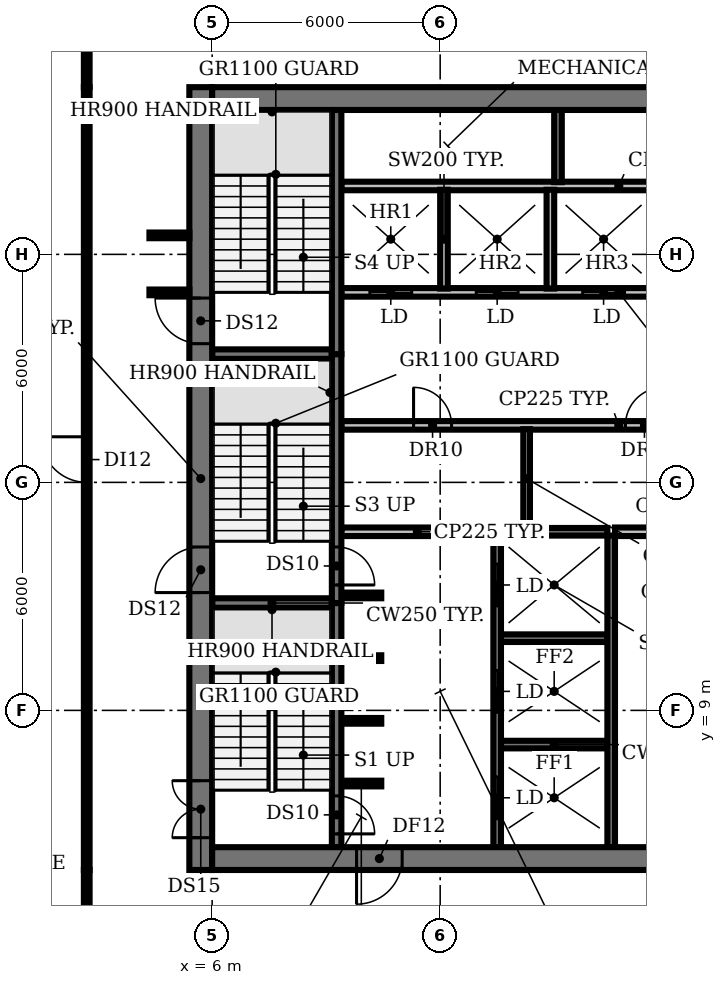
"""IFC4 building model, lengths in metres.
Left out: names, types, materials, properties, quantities, classifications, styles, units other than length and angle.
Written with IfcOpenShell. Run it as: python <this file> out.ifc"""

import sys

from ifc_helpers import new_model, si_unit, direction, frame, frame_2d, origin, place, context, subcontext, project, spatial, rectangle, extrude, element, fill, save


model = new_model("IFC4")
c1 = context("Model", 3, precision=1e-05, world=origin(), true_north=direction((0.0, 1.0)))
c2 = subcontext(c1, "Body", "Model", "MODEL_VIEW")
j1 = project(units=[si_unit("LENGTHUNIT", "METRE"), si_unit("PLANEANGLEUNIT", "RADIAN")], contexts=[c1])
p1 = place(None, origin())
s1 = spatial("IfcSite", under=j1, at=p1, CompositionType="ELEMENT")
p2 = place(p1, origin())
s2 = spatial("IfcBuilding", under=s1, at=p2, CompositionType="ELEMENT")
p3 = place(p2, frame((0.0, 0.0, 146.6)))
s3 = spatial("IfcBuildingStorey", under=s2, at=p3, CompositionType="ELEMENT", Elevation=146.6)
p4 = place(p3, frame((9.4, 7.075, 0.0), z_axis=(0.0, 0.0, 1.0), x_axis=(1.0, 0.0, 0.0)))
e1 = element("IfcWall", 1, at=p4, inside=s3, PredefinedType="SHEAR", context=c2, shape_type="SweptSolid", body=[
    extrude(rectangle(XDim=1.05, YDim=0.15, at=frame_2d((0.525, 0.0))), origin(), (0.0, 0.0, 1.0), 3.85),
])
p5 = place(p3, frame((13.6, 8.1, 0.0), z_axis=(0.0, 0.0, 1.0), x_axis=(1.0, 0.0, 0.0)))
e2 = element("IfcWall", 2, at=p5, inside=s3, PredefinedType="SHEAR", context=c2, shape_type="SweptSolid", body=[
    extrude(rectangle(XDim=2.8, YDim=0.2, at=frame_2d((1.4, 0.0))), origin(), (0.0, 0.0, 1.0), 3.85),
])
for number, where, z_axis, x_axis in (
    (3, (9.4, 8.725, 0.0), (0.0, 0.0, 1.0), (1.0, 0.0, 0.0)),
    (4, (9.4, 10.375, 0.0), (0.0, 0.0, 1.0), (1.0, 0.0, 0.0)),
):
    element("IfcWall", number, at=place(p3, frame(where, z_axis=z_axis, x_axis=x_axis)), inside=s3, PredefinedType="SHEAR", context=c2, shape_type="SweptSolid", body=[
        extrude(rectangle(XDim=1.05, YDim=0.15, at=frame_2d((0.525, 0.0))), origin(), (0.0, 0.0, 1.0), 3.85),
    ])
p6 = place(p3, frame((13.6, 10.9, 0.0), z_axis=(0.0, 0.0, 1.0), x_axis=(1.0, 0.0, 0.0)))
e5 = element("IfcWall", 5, at=p6, inside=s3, PredefinedType="SHEAR", context=c2, shape_type="SweptSolid", body=[
    extrude(rectangle(XDim=2.8, YDim=0.2, at=frame_2d((1.4, 0.0))), origin(), (0.0, 0.0, 1.0), 3.85),
])
p7 = place(p3, frame((6.0, 11.825, 0.0), z_axis=(0.0, 0.0, 1.0), x_axis=(1.0, 0.0, 0.0)))
e6 = element("IfcWall", 6, at=p7, inside=s3, PredefinedType="SHEAR", context=c2, shape_type="SweptSolid", body=[
    extrude(rectangle(XDim=3.15, YDim=0.25, at=frame_2d((1.575, 0.0))), origin(), (0.0, 0.0, 1.0), 3.85),
])
p8 = place(p3, frame((9.4, 12.025, 0.0), z_axis=(0.0, 0.0, 1.0), x_axis=(1.0, 0.0, 0.0)))
e7 = element("IfcWall", 7, at=p8, inside=s3, PredefinedType="SHEAR", context=c2, shape_type="SweptSolid", body=[
    extrude(rectangle(XDim=1.05, YDim=0.15, at=frame_2d((0.525, 0.0))), origin(), (0.0, 0.0, 1.0), 3.85),
])
p9 = place(p3, frame((9.4, 13.7, 0.0), z_axis=(0.0, 0.0, 1.0), x_axis=(1.0, 0.0, 0.0)))
e8 = element("IfcWall", 8, at=p9, inside=s3, PredefinedType="PARTITIONING", context=c2, shape_type="SweptSolid", body=[
    extrude(rectangle(XDim=4.0, YDim=0.225, at=frame_2d((2.0, 0.0))), origin(), (0.0, 0.0, 1.0), 3.85),
])
p10 = place(p3, frame((13.6, 13.7, 0.0), z_axis=(0.0, 0.0, 1.0), x_axis=(1.0, 0.0, 0.0)))
e9 = element("IfcWall", 9, at=p10, inside=s3, PredefinedType="SHEAR", context=c2, shape_type="SweptSolid", body=[
    extrude(rectangle(XDim=2.8, YDim=0.2, at=frame_2d((1.4, 0.0))), origin(), (0.0, 0.0, 1.0), 3.85),
])
p11 = place(p3, frame((16.6, 13.7, 0.0), z_axis=(0.0, 0.0, 1.0), x_axis=(1.0, 0.0, 0.0)))
e10 = element("IfcWall", 10, at=p11, inside=s3, PredefinedType="PARTITIONING", context=c2, shape_type="SweptSolid", body=[
    extrude(rectangle(XDim=7.4, YDim=0.225, at=frame_2d((3.7, 0.0))), origin(), (0.0, 0.0, 1.0), 3.85),
])
p12 = place(p3, frame((9.4, 16.5, 0.0), z_axis=(0.0, 0.0, 1.0), x_axis=(1.0, 0.0, 0.0)))
e11 = element("IfcWall", 11, at=p12, inside=s3, PredefinedType="PARTITIONING", context=c2, shape_type="SweptSolid", body=[
    extrude(rectangle(XDim=14.6, YDim=0.225, at=frame_2d((7.3, 0.0))), origin(), (0.0, 0.0, 1.0), 3.85),
])
p13 = place(p12, frame((1.9, 0.0, 0.0)))
e12 = element("IfcOpeningElement", 12, at=p13, cuts=e11, PredefinedType="OPENING", context=c2, shape_type="SweptSolid", body=[
    extrude(rectangle(XDim=1.0, YDim=2.1, at=frame_2d((0.5, 1.05))), frame((0.0, 0.123, 0.0), z_axis=(0.0, -1.0, 0.0), x_axis=(1.0, 0.0, 0.0)), (0.0, 0.0, 1.0), 0.245),
])
p14 = place(p12, frame((7.475, 0.0, 0.0)))
e13 = element("IfcOpeningElement", 13, at=p14, cuts=e11, PredefinedType="OPENING", context=c2, shape_type="SweptSolid", body=[
    extrude(rectangle(XDim=1.0, YDim=2.1, at=frame_2d((0.5, 1.05))), frame((0.0, 0.123, 0.0), z_axis=(0.0, -1.0, 0.0), x_axis=(1.0, 0.0, 0.0)), (0.0, 0.0, 1.0), 0.245),
])
p15 = place(p12, frame((12.4, 0.0, 0.0)))
e14 = element("IfcOpeningElement", 14, at=p15, cuts=e11, PredefinedType="OPENING", context=c2, shape_type="SweptSolid", body=[
    extrude(rectangle(XDim=1.0, YDim=2.1, at=frame_2d((0.5, 1.05))), frame((0.0, 0.123, 0.0), z_axis=(0.0, -1.0, 0.0), x_axis=(1.0, 0.0, 0.0)), (0.0, 0.0, 1.0), 0.245),
])
p16 = place(p3, frame((6.0, 18.375, 0.0), z_axis=(0.0, 0.0, 1.0), x_axis=(1.0, 0.0, 0.0)))
e15 = element("IfcWall", 15, at=p16, inside=s3, PredefinedType="SHEAR", context=c2, shape_type="SweptSolid", body=[
    extrude(rectangle(XDim=3.15, YDim=0.25, at=frame_2d((1.575, 0.0))), origin(), (0.0, 0.0, 1.0), 3.85),
])
p17 = place(p3, frame((24.0, 20.0, 0.0), z_axis=(0.0, 0.0, 1.0), x_axis=(-1.0, 0.0, 0.0)))
e16 = element("IfcWall", 16, at=p17, inside=s3, PredefinedType="PARTITIONING", context=c2, shape_type="SweptSolid", body=[
    extrude(rectangle(XDim=14.6, YDim=0.225, at=frame_2d((7.3, 0.0))), origin(), (0.0, 0.0, 1.0), 3.85),
])
p18 = place(p17, frame((12.75, 0.0, 0.0)))
e17 = element("IfcOpeningElement", 17, at=p18, cuts=e16, PredefinedType="OPENING", context=c2, shape_type="SweptSolid", body=[
    extrude(rectangle(XDim=1.1, YDim=2.1, at=frame_2d((0.55, 1.05))), frame((0.0, 0.123, 0.0), z_axis=(0.0, -1.0, 0.0), x_axis=(1.0, 0.0, 0.0)), (0.0, 0.0, 1.0), 0.245),
])
p19 = place(p17, frame((9.95, 0.0, 0.0)))
e18 = element("IfcOpeningElement", 18, at=p19, cuts=e16, PredefinedType="OPENING", context=c2, shape_type="SweptSolid", body=[
    extrude(rectangle(XDim=1.1, YDim=2.1, at=frame_2d((0.55, 1.05))), frame((0.0, 0.123, 0.0), z_axis=(0.0, -1.0, 0.0), x_axis=(1.0, 0.0, 0.0)), (0.0, 0.0, 1.0), 0.245),
])
p20 = place(p17, frame((7.15, 0.0, 0.0)))
e19 = element("IfcOpeningElement", 19, at=p20, cuts=e16, PredefinedType="OPENING", context=c2, shape_type="SweptSolid", body=[
    extrude(rectangle(XDim=1.1, YDim=2.1, at=frame_2d((0.55, 1.05))), frame((0.0, 0.123, 0.0), z_axis=(0.0, -1.0, 0.0), x_axis=(1.0, 0.0, 0.0)), (0.0, 0.0, 1.0), 0.245),
])
p21 = place(p17, frame((4.35, 0.0, 0.0)))
e20 = element("IfcOpeningElement", 20, at=p21, cuts=e16, PredefinedType="OPENING", context=c2, shape_type="SweptSolid", body=[
    extrude(rectangle(XDim=1.1, YDim=2.1, at=frame_2d((0.55, 1.05))), frame((0.0, 0.123, 0.0), z_axis=(0.0, -1.0, 0.0), x_axis=(1.0, 0.0, 0.0)), (0.0, 0.0, 1.0), 0.245),
])
p22 = place(p17, frame((1.2, 0.0, 0.0)))
e21 = element("IfcOpeningElement", 21, at=p22, cuts=e16, PredefinedType="OPENING", context=c2, shape_type="SweptSolid", body=[
    extrude(rectangle(XDim=1.0, YDim=2.1, at=frame_2d((0.5, 1.05))), frame((0.0, 0.123, 0.0), z_axis=(0.0, -1.0, 0.0), x_axis=(1.0, 0.0, 0.0)), (0.0, 0.0, 1.0), 0.245),
])
p23 = place(p3, frame((9.4, 22.8, 0.0), z_axis=(0.0, 0.0, 1.0), x_axis=(1.0, 0.0, 0.0)))
e22 = element("IfcWall", 22, at=p23, inside=s3, PredefinedType="PARTITIONING", context=c2, shape_type="SweptSolid", body=[
    extrude(rectangle(XDim=14.6, YDim=0.225, at=frame_2d((7.3, 0.0))), origin(), (0.0, 0.0, 1.0), 3.85),
])
p24 = place(p3, frame((9.275, 11.825, 0.0), z_axis=(0.0, 0.0, 1.0), x_axis=(0.0, -1.0, 0.0)))
e23 = element("IfcWall", 23, at=p24, inside=s3, PredefinedType="SHEAR", context=c2, shape_type="SweptSolid", body=[
    extrude(rectangle(XDim=6.425, YDim=0.25, at=frame_2d((3.212, 0.0))), origin(), (0.0, 0.0, 1.0), 3.85),
])
p25 = place(p24, frame((5.075, 0.0, 0.0)))
e24 = element("IfcOpeningElement", 24, at=p25, cuts=e23, PredefinedType="OPENING", context=c2, shape_type="SweptSolid", body=[
    extrude(rectangle(XDim=1.0, YDim=2.1, at=frame_2d((0.5, 1.05))), frame((0.0, 0.135, 0.0), z_axis=(0.0, -1.0, 0.0), x_axis=(1.0, 0.0, 0.0)), (0.0, 0.0, 1.0), 0.27),
])
p26 = place(p3, frame((9.275, 18.375, 0.0), z_axis=(0.0, 0.0, 1.0), x_axis=(0.0, -1.0, 0.0)))
e25 = element("IfcWall", 25, at=p26, inside=s3, PredefinedType="SHEAR", context=c2, shape_type="SweptSolid", body=[
    extrude(rectangle(XDim=6.55, YDim=0.25, at=frame_2d((3.275, 0.0))), origin(), (0.0, 0.0, 1.0), 3.85),
])
p27 = place(p26, frame((5.075, 0.0, 0.0)))
e26 = element("IfcOpeningElement", 26, at=p27, cuts=e25, PredefinedType="OPENING", context=c2, shape_type="SweptSolid", body=[
    extrude(rectangle(XDim=1.0, YDim=2.1, at=frame_2d((0.5, 1.05))), frame((0.0, 0.135, 0.0), z_axis=(0.0, -1.0, 0.0), x_axis=(1.0, 0.0, 0.0)), (0.0, 0.0, 1.0), 0.27),
])
p28 = place(p3, frame((9.275, 18.375, 0.0), z_axis=(0.0, 0.0, 1.0), x_axis=(0.0, 1.0, 0.0)))
e27 = element("IfcWall", 27, at=p28, inside=s3, PredefinedType="SHEAR", context=c2, shape_type="SweptSolid", body=[
    extrude(rectangle(XDim=6.425, YDim=0.25, at=frame_2d((3.212, 0.0))), origin(), (0.0, 0.0, 1.0), 3.85),
])
p29 = place(p3, frame((12.1, 20.1, 0.0), z_axis=(0.0, 0.0, 1.0), x_axis=(0.0, 1.0, 0.0)))
e28 = element("IfcWall", 28, at=p29, inside=s3, PredefinedType="SOLIDWALL", context=c2, shape_type="SweptSolid", body=[
    extrude(rectangle(XDim=2.6, YDim=0.2, at=frame_2d((1.3, 0.0))), origin(), (0.0, 0.0, 1.0), 3.85),
])
p30 = place(p3, frame((13.5, 5.4, 0.0), z_axis=(0.0, 0.0, 1.0), x_axis=(0.0, 1.0, 0.0)))
e29 = element("IfcWall", 29, at=p30, inside=s3, PredefinedType="SHEAR", context=c2, shape_type="SweptSolid", body=[
    extrude(rectangle(XDim=8.2, YDim=0.2, at=frame_2d((4.1, 0.0))), origin(), (0.0, 0.0, 1.0), 3.85),
])
p31 = place(p30, frame((0.75, 0.0, 0.0)))
e30 = element("IfcOpeningElement", 30, at=p31, cuts=e29, PredefinedType="OPENING", context=c2, shape_type="SweptSolid", body=[
    extrude(rectangle(XDim=1.1, YDim=2.1, at=frame_2d((0.55, 1.05))), frame((0.0, 0.11, 0.0), z_axis=(0.0, -1.0, 0.0), x_axis=(1.0, 0.0, 0.0)), (0.0, 0.0, 1.0), 0.22),
])
p32 = place(p30, frame((3.55, 0.0, 0.0)))
e31 = element("IfcOpeningElement", 31, at=p32, cuts=e29, PredefinedType="OPENING", context=c2, shape_type="SweptSolid", body=[
    extrude(rectangle(XDim=1.1, YDim=2.1, at=frame_2d((0.55, 1.05))), frame((0.0, 0.11, 0.0), z_axis=(0.0, -1.0, 0.0), x_axis=(1.0, 0.0, 0.0)), (0.0, 0.0, 1.0), 0.22),
])
p33 = place(p30, frame((6.35, 0.0, 0.0)))
e32 = element("IfcOpeningElement", 32, at=p33, cuts=e29, PredefinedType="OPENING", context=c2, shape_type="SweptSolid", body=[
    extrude(rectangle(XDim=1.1, YDim=2.1, at=frame_2d((0.55, 1.05))), frame((0.0, 0.11, 0.0), z_axis=(0.0, -1.0, 0.0), x_axis=(1.0, 0.0, 0.0)), (0.0, 0.0, 1.0), 0.22),
])
p34 = place(p3, frame((14.275, 13.8, 0.0), z_axis=(0.0, 0.0, 1.0), x_axis=(0.0, 1.0, 0.0)))
e33 = element("IfcWall", 33, at=p34, inside=s3, PredefinedType="PARTITIONING", context=c2, shape_type="SweptSolid", body=[
    extrude(rectangle(XDim=2.6, YDim=0.175, at=frame_2d((1.3, 0.0))), origin(), (0.0, 0.0, 1.0), 3.85),
])
p35 = place(p3, frame((14.9, 20.1, 0.0), z_axis=(0.0, 0.0, 1.0), x_axis=(0.0, 1.0, 0.0)))
e34 = element("IfcWall", 34, at=p35, inside=s3, PredefinedType="SOLIDWALL", context=c2, shape_type="SweptSolid", body=[
    extrude(rectangle(XDim=2.6, YDim=0.2, at=frame_2d((1.3, 0.0))), origin(), (0.0, 0.0, 1.0), 3.85),
])
p36 = place(p3, frame((15.1, 22.9, 0.0), z_axis=(0.0, 0.0, 1.0), x_axis=(0.0, 1.0, 0.0)))
e35 = element("IfcWall", 35, at=p36, inside=s3, PredefinedType="SHEAR", context=c2, shape_type="SweptSolid", body=[
    extrude(rectangle(XDim=1.9, YDim=0.2, at=frame_2d((0.95, 0.0))), origin(), (0.0, 0.0, 1.0), 3.85),
])
p37 = place(p3, frame((16.5, 5.4, 0.0), z_axis=(0.0, 0.0, 1.0), x_axis=(0.0, 1.0, 0.0)))
e36 = element("IfcWall", 36, at=p37, inside=s3, PredefinedType="SHEAR", context=c2, shape_type="SweptSolid", body=[
    extrude(rectangle(XDim=8.2, YDim=0.2, at=frame_2d((4.1, 0.0))), origin(), (0.0, 0.0, 1.0), 3.85),
])
p38 = place(p3, frame((5.7, 4.8, 0.0), z_axis=(0.0, 0.0, 1.0), x_axis=(0.0, 1.0, 0.0)))
e37 = element("IfcWall", 37, at=p38, inside=s3, PredefinedType="SHEAR", context=c2, shape_type="SweptSolid", body=[
    extrude(rectangle(XDim=20.6, YDim=0.6, at=frame_2d((10.3, 0.0))), origin(), (0.0, 0.0, 1.0), 3.85),
])
p39 = place(p38, frame((0.85, 0.0, 0.0)))
e38 = element("IfcOpeningElement", 38, at=p39, cuts=e37, PredefinedType="OPENING", context=c2, shape_type="SweptSolid", body=[
    extrude(rectangle(XDim=1.5, YDim=2.1, at=frame_2d((0.75, 1.05))), frame((0.0, 0.31, 0.0), z_axis=(0.0, -1.0, 0.0), x_axis=(1.0, 0.0, 0.0)), (0.0, 0.0, 1.0), 0.62),
])
p40 = place(p38, frame((7.3, 0.0, 0.0)))
e39 = element("IfcOpeningElement", 39, at=p40, cuts=e37, PredefinedType="OPENING", context=c2, shape_type="SweptSolid", body=[
    extrude(rectangle(XDim=1.2, YDim=2.1, at=frame_2d((0.6, 1.05))), frame((0.0, 0.31, 0.0), z_axis=(0.0, -1.0, 0.0), x_axis=(1.0, 0.0, 0.0)), (0.0, 0.0, 1.0), 0.62),
])
p41 = place(p38, frame((13.85, 0.0, 0.0)))
e40 = element("IfcOpeningElement", 40, at=p41, cuts=e37, PredefinedType="OPENING", context=c2, shape_type="SweptSolid", body=[
    extrude(rectangle(XDim=1.2, YDim=2.1, at=frame_2d((0.6, 1.05))), frame((0.0, 0.31, 0.0), z_axis=(0.0, -1.0, 0.0), x_axis=(1.0, 0.0, 0.0)), (0.0, 0.0, 1.0), 0.62),
])
p42 = place(p3, frame((24.0, 5.1, 0.0), z_axis=(0.0, 0.0, 1.0), x_axis=(-1.0, 0.0, 0.0)))
e41 = element("IfcWall", 41, at=p42, inside=s3, PredefinedType="SHEAR", context=c2, shape_type="SweptSolid", body=[
    extrude(rectangle(XDim=18.0, YDim=0.6, at=frame_2d((9.0, 0.0))), origin(), (0.0, 0.0, 1.0), 3.85),
])
p43 = place(p42, frame((13.0, 0.0, 0.0)))
e42 = element("IfcOpeningElement", 42, at=p43, cuts=e41, PredefinedType="OPENING", context=c2, shape_type="SweptSolid", body=[
    extrude(rectangle(XDim=1.2, YDim=2.1, at=frame_2d((0.6, 1.05))), frame((0.0, 0.31, 0.0), z_axis=(0.0, -1.0, 0.0), x_axis=(1.0, 0.0, 0.0)), (0.0, 0.0, 1.0), 0.62),
])
p44 = place(p42, frame((4.9, 0.0, 0.0)))
e43 = element("IfcOpeningElement", 43, at=p44, cuts=e41, PredefinedType="OPENING", context=c2, shape_type="SweptSolid", body=[
    extrude(rectangle(XDim=1.0, YDim=2.1, at=frame_2d((0.5, 1.05))), frame((0.0, 0.31, 0.0), z_axis=(0.0, -1.0, 0.0), x_axis=(1.0, 0.0, 0.0)), (0.0, 0.0, 1.0), 0.62),
])
p45 = place(p3, frame((6.0, 25.1, 0.0), z_axis=(0.0, 0.0, 1.0), x_axis=(1.0, 0.0, 0.0)))
e44 = element("IfcWall", 44, at=p45, inside=s3, PredefinedType="SHEAR", context=c2, shape_type="SweptSolid", body=[
    extrude(rectangle(XDim=18.0, YDim=0.6, at=frame_2d((9.0, 0.0))), origin(), (0.0, 0.0, 1.0), 3.85),
])
p46 = place(p3, frame((2.7, 0.9, 0.0), z_axis=(0.0, 0.0, 1.0), x_axis=(0.0, 1.0, 0.0)))
e45 = element("IfcWall", 45, at=p46, inside=s3, PredefinedType="PARTITIONING", context=c2, shape_type="SweptSolid", body=[
    extrude(rectangle(XDim=3.9, YDim=0.15, at=frame_2d((1.95, 0.0))), origin(), (0.0, 0.0, 1.0), 2.88),
])
p47 = place(p3, frame((2.7, 4.8, 0.0), z_axis=(0.0, 0.0, 1.0), x_axis=(0.0, 1.0, 0.0)))
e46 = element("IfcWall", 46, at=p47, inside=s3, PredefinedType="PARTITIONING", context=c2, shape_type="SweptSolid", body=[
    extrude(rectangle(XDim=20.6, YDim=0.15, at=frame_2d((10.3, 0.0))), origin(), (0.0, 0.0, 1.0), 2.88),
])
p48 = place(p47, frame((10.2, 0.0, 0.0)))
e47 = element("IfcOpeningElement", 47, at=p48, cuts=e46, PredefinedType="OPENING", context=c2, shape_type="SweptSolid", body=[
    extrude(rectangle(XDim=1.2, YDim=2.1, at=frame_2d((0.6, 1.05))), frame((0.0, 0.085, 0.0), z_axis=(0.0, -1.0, 0.0), x_axis=(1.0, 0.0, 0.0)), (0.0, 0.0, 1.0), 0.17),
])
p49 = place(p3, frame((2.7, 25.4, 0.0), z_axis=(0.0, 0.0, 1.0), x_axis=(0.0, 1.0, 0.0)))
e48 = element("IfcWall", 48, at=p49, inside=s3, PredefinedType="PARTITIONING", context=c2, shape_type="SweptSolid", body=[
    extrude(rectangle(XDim=3.9, YDim=0.15, at=frame_2d((1.95, 0.0))), origin(), (0.0, 0.0, 1.0), 2.88),
])
for number, where, z_axis, x_axis in (
    (49, (4.35, 20.0, 0.0), (0.0, 0.0, 1.0), (1.0, 0.0, 0.0)),
    (50, (4.35, 21.5, 0.0), (0.0, 0.0, 1.0), (1.0, 0.0, 0.0)),
):
    element("IfcWall", number, at=place(p3, frame(where, z_axis=z_axis, x_axis=x_axis)), inside=s3, PredefinedType="PARTITIONING", context=c2, shape_type="SweptSolid", body=[
        extrude(rectangle(XDim=1.05, YDim=0.15, at=frame_2d((0.525, 0.0))), origin(), (0.0, 0.0, 1.0), 2.88),
    ])
p50 = place(p13, origin())
e51 = element("IfcDoor", 51, at=p50, inside=s3, OperationType="SINGLE_SWING_LEFT", PredefinedType="DOOR", context=c2, shape_type="SweptSolid", body=[
    extrude(rectangle(XDim=1.0, YDim=2.1, at=frame_2d((0.5, 1.05))), frame((0.0, 0.025, 0.0), z_axis=(0.0, -1.0, 0.0), x_axis=(1.0, 0.0, 0.0)), (0.0, 0.0, 1.0), 0.05),
])
fill(e12, e51)
p51 = place(p14, origin())
e52 = element("IfcDoor", 52, at=p51, inside=s3, OperationType="SINGLE_SWING_RIGHT", PredefinedType="DOOR", context=c2, shape_type="SweptSolid", body=[
    extrude(rectangle(XDim=1.0, YDim=2.1, at=frame_2d((0.5, 1.05))), frame((0.0, 0.025, 0.0), z_axis=(0.0, -1.0, 0.0), x_axis=(1.0, 0.0, 0.0)), (0.0, 0.0, 1.0), 0.05),
])
fill(e13, e52)
p52 = place(p18, origin())
e53 = element("IfcDoor", 53, at=p52, inside=s3, OperationType="DOUBLE_DOOR_SLIDING", PredefinedType="DOOR", context=c2, shape_type="SweptSolid", body=[
    extrude(rectangle(XDim=1.1, YDim=2.1, at=frame_2d((0.55, 1.05))), frame((0.0, 0.025, 0.0), z_axis=(0.0, -1.0, 0.0), x_axis=(1.0, 0.0, 0.0)), (0.0, 0.0, 1.0), 0.05),
])
fill(e17, e53)
p53 = place(p19, origin())
e54 = element("IfcDoor", 54, at=p53, inside=s3, OperationType="DOUBLE_DOOR_SLIDING", PredefinedType="DOOR", context=c2, shape_type="SweptSolid", body=[
    extrude(rectangle(XDim=1.1, YDim=2.1, at=frame_2d((0.55, 1.05))), frame((0.0, 0.025, 0.0), z_axis=(0.0, -1.0, 0.0), x_axis=(1.0, 0.0, 0.0)), (0.0, 0.0, 1.0), 0.05),
])
fill(e18, e54)
p54 = place(p20, origin())
e55 = element("IfcDoor", 55, at=p54, inside=s3, OperationType="DOUBLE_DOOR_SLIDING", PredefinedType="DOOR", context=c2, shape_type="SweptSolid", body=[
    extrude(rectangle(XDim=1.1, YDim=2.1, at=frame_2d((0.55, 1.05))), frame((0.0, 0.025, 0.0), z_axis=(0.0, -1.0, 0.0), x_axis=(1.0, 0.0, 0.0)), (0.0, 0.0, 1.0), 0.05),
])
fill(e19, e55)
p55 = place(p25, origin())
e56 = element("IfcDoor", 56, at=p55, inside=s3, OperationType="SINGLE_SWING_RIGHT", PredefinedType="DOOR", context=c2, shape_type="SweptSolid", body=[
    extrude(rectangle(XDim=1.0, YDim=2.1, at=frame_2d((0.5, 1.05))), frame((0.0, 0.025, 0.0), z_axis=(0.0, -1.0, 0.0), x_axis=(1.0, 0.0, 0.0)), (0.0, 0.0, 1.0), 0.05),
])
fill(e24, e56)
p56 = place(p27, origin())
e57 = element("IfcDoor", 57, at=p56, inside=s3, OperationType="SINGLE_SWING_RIGHT", PredefinedType="DOOR", context=c2, shape_type="SweptSolid", body=[
    extrude(rectangle(XDim=1.0, YDim=2.1, at=frame_2d((0.5, 1.05))), frame((0.0, 0.025, 0.0), z_axis=(0.0, -1.0, 0.0), x_axis=(1.0, 0.0, 0.0)), (0.0, 0.0, 1.0), 0.05),
])
fill(e26, e57)
p57 = place(p31, origin())
e58 = element("IfcDoor", 58, at=p57, inside=s3, OperationType="DOUBLE_DOOR_SLIDING", PredefinedType="DOOR", context=c2, shape_type="SweptSolid", body=[
    extrude(rectangle(XDim=1.1, YDim=2.1, at=frame_2d((0.55, 1.05))), frame((0.0, 0.025, 0.0), z_axis=(0.0, -1.0, 0.0), x_axis=(1.0, 0.0, 0.0)), (0.0, 0.0, 1.0), 0.05),
])
fill(e30, e58)
p58 = place(p32, origin())
e59 = element("IfcDoor", 59, at=p58, inside=s3, OperationType="DOUBLE_DOOR_SLIDING", PredefinedType="DOOR", context=c2, shape_type="SweptSolid", body=[
    extrude(rectangle(XDim=1.1, YDim=2.1, at=frame_2d((0.55, 1.05))), frame((0.0, 0.025, 0.0), z_axis=(0.0, -1.0, 0.0), x_axis=(1.0, 0.0, 0.0)), (0.0, 0.0, 1.0), 0.05),
])
fill(e31, e59)
p59 = place(p33, origin())
e60 = element("IfcDoor", 60, at=p59, inside=s3, OperationType="DOUBLE_DOOR_SLIDING", PredefinedType="DOOR", context=c2, shape_type="SweptSolid", body=[
    extrude(rectangle(XDim=1.1, YDim=2.1, at=frame_2d((0.55, 1.05))), frame((0.0, 0.025, 0.0), z_axis=(0.0, -1.0, 0.0), x_axis=(1.0, 0.0, 0.0)), (0.0, 0.0, 1.0), 0.05),
])
fill(e32, e60)
p60 = place(p39, origin())
e61 = element("IfcDoor", 61, at=p60, inside=s3, OperationType="DOUBLE_DOOR_SINGLE_SWING", PredefinedType="DOOR", context=c2, shape_type="SweptSolid", body=[
    extrude(rectangle(XDim=1.5, YDim=2.1, at=frame_2d((0.75, 1.05))), frame((0.0, 0.025, 0.0), z_axis=(0.0, -1.0, 0.0), x_axis=(1.0, 0.0, 0.0)), (0.0, 0.0, 1.0), 0.05),
])
fill(e38, e61)
p61 = place(p40, origin())
e62 = element("IfcDoor", 62, at=p61, inside=s3, OperationType="SINGLE_SWING_LEFT", PredefinedType="DOOR", context=c2, shape_type="SweptSolid", body=[
    extrude(rectangle(XDim=1.2, YDim=2.1, at=frame_2d((0.6, 1.05))), frame((0.0, 0.025, 0.0), z_axis=(0.0, -1.0, 0.0), x_axis=(1.0, 0.0, 0.0)), (0.0, 0.0, 1.0), 0.05),
])
fill(e39, e62)
p62 = place(p41, origin())
e63 = element("IfcDoor", 63, at=p62, inside=s3, OperationType="SINGLE_SWING_RIGHT", PredefinedType="DOOR", context=c2, shape_type="SweptSolid", body=[
    extrude(rectangle(XDim=1.2, YDim=2.1, at=frame_2d((0.6, 1.05))), frame((0.0, 0.025, 0.0), z_axis=(0.0, -1.0, 0.0), x_axis=(1.0, 0.0, 0.0)), (0.0, 0.0, 1.0), 0.05),
])
fill(e40, e63)
p63 = place(p43, origin())
e64 = element("IfcDoor", 64, at=p63, inside=s3, OperationType="SINGLE_SWING_RIGHT", PredefinedType="DOOR", context=c2, shape_type="SweptSolid", body=[
    extrude(rectangle(XDim=1.2, YDim=2.1, at=frame_2d((0.6, 1.05))), frame((0.0, 0.025, 0.0), z_axis=(0.0, -1.0, 0.0), x_axis=(1.0, 0.0, 0.0)), (0.0, 0.0, 1.0), 0.05),
])
fill(e42, e64)
p64 = place(p48, origin())
e65 = element("IfcDoor", 65, at=p64, inside=s3, OperationType="SINGLE_SWING_RIGHT", PredefinedType="DOOR", context=c2, shape_type="SweptSolid", body=[
    extrude(rectangle(XDim=1.2, YDim=2.1, at=frame_2d((0.6, 1.05))), frame((0.0, 0.025, 0.0), z_axis=(0.0, -1.0, 0.0), x_axis=(1.0, 0.0, 0.0)), (0.0, 0.0, 1.0), 0.05),
])
fill(e47, e65)
save(model, sys.argv[1])
